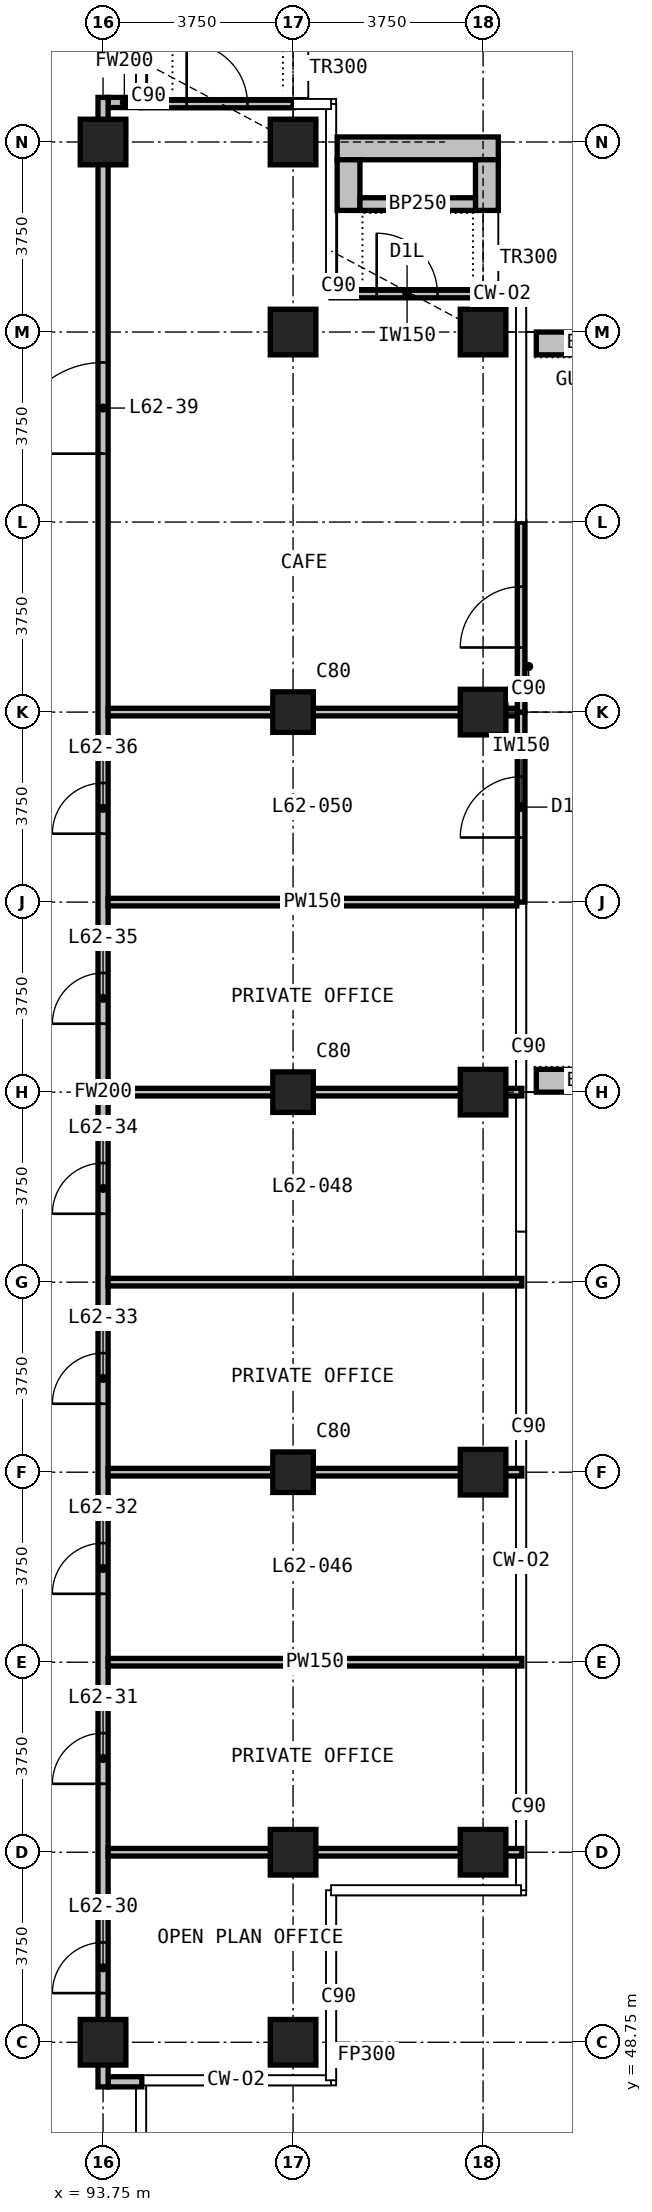
"""IFC4 building model, lengths in metres.
Left out: names, types, materials, properties, quantities, classifications, styles, units other than length and angle.
Written with IfcOpenShell. Run it as: python <this file> out.ifc"""

import sys

from ifc_helpers import new_model, si_unit, direction, frame, frame_2d, origin, origin_2d, place, context, subcontext, project, spatial, rectangle, extrude, element, fill, save


model = new_model("IFC4")
c1 = context("Model", 3, precision=1e-05, world=origin(), true_north=direction((0.0, 1.0)))
c2 = subcontext(c1, "Body", "Model", "MODEL_VIEW")
j1 = project(units=[si_unit("LENGTHUNIT", "METRE"), si_unit("PLANEANGLEUNIT", "RADIAN")], contexts=[c1])
p1 = place(None, origin())
s1 = spatial("IfcSite", under=j1, at=p1, CompositionType="ELEMENT")
p2 = place(p1, origin())
s2 = spatial("IfcBuilding", under=s1, at=p2, CompositionType="ELEMENT")
p3 = place(p2, frame((0.0, 0.0, 239.1)))
s3 = spatial("IfcBuildingStorey", under=s2, at=p3, CompositionType="ELEMENT", Elevation=239.1)
for number, where, z_axis, x_axis in (
    (1, (93.75, 48.75, 0.0), (0.0, 0.0, 1.0), (1.0, 0.0, 0.0)),
    (2, (93.75, 86.25, 0.0), (0.0, 0.0, 1.0), (1.0, 0.0, 0.0)),
    (3, (97.5, 48.75, 0.0), (0.0, 0.0, 1.0), (1.0, 0.0, 0.0)),
    (4, (97.5, 52.5, 0.0), (0.0, 0.0, 1.0), (1.0, 0.0, 0.0)),
):
    element("IfcColumn", number, at=place(p3, frame(where, z_axis=z_axis, x_axis=x_axis)), inside=s3, PredefinedType="COLUMN", context=c2, shape_type="SweptSolid", body=[
        extrude(rectangle(XDim=0.9, YDim=0.9, at=origin_2d()), origin(), (0.0, 0.0, 1.0), 3.6),
    ])
for number, where, z_axis, x_axis in (
    (5, (97.5, 60.0, 0.0), (0.0, 0.0, 1.0), (1.0, 0.0, 0.0)),
    (6, (97.5, 67.5, 0.0), (0.0, 0.0, 1.0), (1.0, 0.0, 0.0)),
    (7, (97.5, 75.0, 0.0), (0.0, 0.0, 1.0), (1.0, 0.0, 0.0)),
):
    element("IfcColumn", number, at=place(p3, frame(where, z_axis=z_axis, x_axis=x_axis)), inside=s3, PredefinedType="COLUMN", context=c2, shape_type="SweptSolid", body=[
        extrude(rectangle(XDim=0.8, YDim=0.8, at=origin_2d()), origin(), (0.0, 0.0, 1.0), 3.6),
    ])
for number, where, z_axis, x_axis in (
    (8, (97.5, 82.5, 0.0), (0.0, 0.0, 1.0), (1.0, 0.0, 0.0)),
    (9, (97.5, 86.25, 0.0), (0.0, 0.0, 1.0), (1.0, 0.0, 0.0)),
    (10, (101.25, 52.5, 0.0), (0.0, 0.0, 1.0), (1.0, 0.0, 0.0)),
    (11, (101.25, 60.0, 0.0), (0.0, 0.0, 1.0), (1.0, 0.0, 0.0)),
    (12, (101.25, 67.5, 0.0), (0.0, 0.0, 1.0), (1.0, 0.0, 0.0)),
    (13, (101.25, 75.0, 0.0), (0.0, 0.0, 1.0), (1.0, 0.0, 0.0)),
    (14, (101.25, 82.5, 0.0), (0.0, 0.0, 1.0), (1.0, 0.0, 0.0)),
):
    element("IfcColumn", number, at=place(p3, frame(where, z_axis=z_axis, x_axis=x_axis)), inside=s3, PredefinedType="COLUMN", context=c2, shape_type="SweptSolid", body=[
        extrude(rectangle(XDim=0.9, YDim=0.9, at=origin_2d()), origin(), (0.0, 0.0, 1.0), 3.6),
    ])
p4 = place(p3, frame((102.0, 71.25, 0.0), z_axis=(0.0, 0.0, 1.0), x_axis=(0.0, 1.0, 0.0)))
e15 = element("IfcWall", 15, at=p4, inside=s3, PredefinedType="SOLIDWALL", context=c2, shape_type="SweptSolid", body=[
    extrude(rectangle(XDim=3.75, YDim=0.15, at=frame_2d((1.875, 0.0))), origin(), (0.0, 0.0, 1.0), 3.3),
])
p5 = place(p4, frame((1.275, 0.0, 0.0)))
e16 = element("IfcOpeningElement", 16, at=p5, cuts=e15, PredefinedType="OPENING", context=c2, shape_type="SweptSolid", body=[
    extrude(rectangle(XDim=1.2, YDim=2.4, at=frame_2d((0.6, 1.2))), frame((0.0, 0.085, 0.0), z_axis=(0.0, -1.0, 0.0), x_axis=(1.0, 0.0, 0.0)), (0.0, 0.0, 1.0), 0.17),
])
p6 = place(p3, frame((102.0, 75.0, 0.0), z_axis=(0.0, 0.0, 1.0), x_axis=(0.0, 1.0, 0.0)))
e17 = element("IfcWall", 17, at=p6, inside=s3, PredefinedType="SOLIDWALL", context=c2, shape_type="SweptSolid", body=[
    extrude(rectangle(XDim=3.75, YDim=0.15, at=frame_2d((1.875, 0.0))), origin(), (0.0, 0.0, 1.0), 3.3),
])
p7 = place(p6, frame((1.275, 0.0, 0.0)))
e18 = element("IfcOpeningElement", 18, at=p7, cuts=e17, PredefinedType="OPENING", context=c2, shape_type="SweptSolid", body=[
    extrude(rectangle(XDim=1.2, YDim=2.4, at=frame_2d((0.6, 1.2))), frame((0.0, 0.085, 0.0), z_axis=(0.0, -1.0, 0.0), x_axis=(1.0, 0.0, 0.0)), (0.0, 0.0, 1.0), 0.17),
])
p8 = place(p3, frame((98.25, 83.25, 0.0), z_axis=(0.0, 0.0, 1.0), x_axis=(1.0, 0.0, 0.0)))
e19 = element("IfcWall", 19, at=p8, inside=s3, PredefinedType="SOLIDWALL", context=c2, shape_type="SweptSolid", body=[
    extrude(rectangle(XDim=3.0, YDim=0.15, at=frame_2d((1.5, 0.0))), origin(), (0.0, 0.0, 1.0), 3.3),
])
p9 = place(p8, frame((0.9, 0.0, 0.0)))
e20 = element("IfcOpeningElement", 20, at=p9, cuts=e19, PredefinedType="OPENING", context=c2, shape_type="SweptSolid", body=[
    extrude(rectangle(XDim=1.2, YDim=2.0, at=frame_2d((0.6, 1.0))), frame((0.0, 0.085, 0.0), z_axis=(0.0, -1.0, 0.0), x_axis=(1.0, 0.0, 0.0)), (0.0, 0.0, 1.0), 0.17),
])
p10 = place(p3, frame((94.5, 87.0, 0.0), z_axis=(0.0, 0.0, 1.0), x_axis=(1.0, 0.0, 0.0)))
e21 = element("IfcWall", 21, at=p10, inside=s3, PredefinedType="SOLIDWALL", context=c2, shape_type="SweptSolid", body=[
    extrude(rectangle(XDim=3.0, YDim=0.15, at=frame_2d((1.5, 0.0))), origin(), (0.0, 0.0, 1.0), 3.3),
])
p11 = place(p10, frame((0.9, 0.0, 0.0)))
e22 = element("IfcOpeningElement", 22, at=p11, cuts=e21, PredefinedType="OPENING", context=c2, shape_type="SweptSolid", body=[
    extrude(rectangle(XDim=1.2, YDim=2.0, at=frame_2d((0.6, 1.0))), frame((0.0, 0.085, 0.0), z_axis=(0.0, -1.0, 0.0), x_axis=(1.0, 0.0, 0.0)), (0.0, 0.0, 1.0), 0.17),
])
for number, where, z_axis, x_axis in (
    (23, (102.3, 67.725, 0.0), (0.0, 0.0, 1.0), (1.0, 0.0, 0.0)),
    (24, (102.3, 82.275, 0.0), (0.0, 0.0, 1.0), (1.0, 0.0, 0.0)),
):
    element("IfcWall", number, at=place(p3, frame(where, z_axis=z_axis, x_axis=x_axis)), inside=s3, PredefinedType="USERDEFINED", context=c2, shape_type="SweptSolid", body=[
        extrude(rectangle(XDim=2.35, YDim=0.45, at=frame_2d((1.175, 0.0))), origin(), (0.0, 0.0, 1.0), 1.1),
    ])
p12 = place(p3, frame((98.37, 86.125, 0.0), z_axis=(0.0, 0.0, 1.0), x_axis=(1.0, 0.0, 0.0)))
e25 = element("IfcWall", 25, at=p12, inside=s3, PredefinedType="USERDEFINED", context=c2, shape_type="SweptSolid", body=[
    extrude(rectangle(XDim=3.18, YDim=0.45, at=frame_2d((1.59, 0.0))), origin(), (0.0, 0.0, 1.0), 1.1),
])
for number, where, z_axis, x_axis in (
    (26, (98.595, 84.9, 0.0), (0.0, 0.0, 1.0), (0.0, 1.0, 0.0)),
    (27, (101.325, 84.9, 0.0), (0.0, 0.0, 1.0), (0.0, 1.0, 0.0)),
):
    element("IfcWall", number, at=place(p3, frame(where, z_axis=z_axis, x_axis=x_axis)), inside=s3, PredefinedType="USERDEFINED", context=c2, shape_type="SweptSolid", body=[
        extrude(rectangle(XDim=1.0, YDim=0.45, at=frame_2d((0.5, 0.0))), origin(), (0.0, 0.0, 1.0), 1.1),
    ])
p13 = place(p3, frame((98.82, 85.025, 0.0), z_axis=(0.0, 0.0, 1.0), x_axis=(1.0, 0.0, 0.0)))
e28 = element("IfcWall", 28, at=p13, inside=s3, PredefinedType="USERDEFINED", context=c2, shape_type="SweptSolid", body=[
    extrude(rectangle(XDim=2.28, YDim=0.25, at=frame_2d((1.14, 0.0))), origin(), (0.0, 0.0, 1.0), 1.0),
])
p14 = place(p3, frame((93.85, 47.97, 0.0), z_axis=(0.0, 0.0, 1.0), x_axis=(1.0, 0.0, 0.0)))
e29 = element("IfcWall", 29, at=p14, inside=s3, PredefinedType="PARTITIONING", context=c2, shape_type="SweptSolid", body=[
    extrude(rectangle(XDim=0.665, YDim=0.2, at=frame_2d((0.333, 0.0))), origin(), (0.0, 0.0, 1.0), 3.3),
])
p15 = place(p3, frame((93.85, 87.03, 0.0), z_axis=(0.0, 0.0, 1.0), x_axis=(1.0, 0.0, 0.0)))
e30 = element("IfcWall", 30, at=p15, inside=s3, PredefinedType="PARTITIONING", context=c2, shape_type="SweptSolid", body=[
    extrude(rectangle(XDim=0.64, YDim=0.2, at=frame_2d((0.32, 0.0))), origin(), (0.0, 0.0, 1.0), 3.3),
])
p16 = place(p3, frame((93.75, 47.87, 0.0), z_axis=(0.0, 0.0, 1.0), x_axis=(0.0, 1.0, 0.0)))
e31 = element("IfcWall", 31, at=p16, inside=s3, PredefinedType="PARTITIONING", context=c2, shape_type="SweptSolid", body=[
    extrude(rectangle(XDim=39.26, YDim=0.2, at=frame_2d((19.63, 0.0))), origin(), (0.0, 0.0, 1.0), 3.3),
])
p17 = place(p16, frame((1.85, 0.0, 0.0)))
e32 = element("IfcOpeningElement", 32, at=p17, cuts=e31, PredefinedType="OPENING", context=c2, shape_type="SweptSolid", body=[
    extrude(rectangle(XDim=1.0, YDim=2.2, at=frame_2d((0.5, 1.1))), frame((0.0, 0.11, 0.0), z_axis=(0.0, -1.0, 0.0), x_axis=(1.0, 0.0, 0.0)), (0.0, 0.0, 1.0), 0.22),
])
p18 = place(p16, frame((5.98, 0.0, 0.0)))
e33 = element("IfcOpeningElement", 33, at=p18, cuts=e31, PredefinedType="OPENING", context=c2, shape_type="SweptSolid", body=[
    extrude(rectangle(XDim=1.0, YDim=2.2, at=frame_2d((0.5, 1.1))), frame((0.0, 0.11, 0.0), z_axis=(0.0, -1.0, 0.0), x_axis=(1.0, 0.0, 0.0)), (0.0, 0.0, 1.0), 0.22),
])
p19 = place(p16, frame((9.73, 0.0, 0.0)))
e34 = element("IfcOpeningElement", 34, at=p19, cuts=e31, PredefinedType="OPENING", context=c2, shape_type="SweptSolid", body=[
    extrude(rectangle(XDim=1.0, YDim=2.2, at=frame_2d((0.5, 1.1))), frame((0.0, 0.11, 0.0), z_axis=(0.0, -1.0, 0.0), x_axis=(1.0, 0.0, 0.0)), (0.0, 0.0, 1.0), 0.22),
])
p20 = place(p16, frame((13.48, 0.0, 0.0)))
e35 = element("IfcOpeningElement", 35, at=p20, cuts=e31, PredefinedType="OPENING", context=c2, shape_type="SweptSolid", body=[
    extrude(rectangle(XDim=1.0, YDim=2.2, at=frame_2d((0.5, 1.1))), frame((0.0, 0.11, 0.0), z_axis=(0.0, -1.0, 0.0), x_axis=(1.0, 0.0, 0.0)), (0.0, 0.0, 1.0), 0.22),
])
p21 = place(p16, frame((17.23, 0.0, 0.0)))
e36 = element("IfcOpeningElement", 36, at=p21, cuts=e31, PredefinedType="OPENING", context=c2, shape_type="SweptSolid", body=[
    extrude(rectangle(XDim=1.0, YDim=2.2, at=frame_2d((0.5, 1.1))), frame((0.0, 0.11, 0.0), z_axis=(0.0, -1.0, 0.0), x_axis=(1.0, 0.0, 0.0)), (0.0, 0.0, 1.0), 0.22),
])
p22 = place(p16, frame((20.98, 0.0, 0.0)))
e37 = element("IfcOpeningElement", 37, at=p22, cuts=e31, PredefinedType="OPENING", context=c2, shape_type="SweptSolid", body=[
    extrude(rectangle(XDim=1.0, YDim=2.2, at=frame_2d((0.5, 1.1))), frame((0.0, 0.11, 0.0), z_axis=(0.0, -1.0, 0.0), x_axis=(1.0, 0.0, 0.0)), (0.0, 0.0, 1.0), 0.22),
])
p23 = place(p16, frame((24.73, 0.0, 0.0)))
e38 = element("IfcOpeningElement", 38, at=p23, cuts=e31, PredefinedType="OPENING", context=c2, shape_type="SweptSolid", body=[
    extrude(rectangle(XDim=1.0, YDim=2.2, at=frame_2d((0.5, 1.1))), frame((0.0, 0.11, 0.0), z_axis=(0.0, -1.0, 0.0), x_axis=(1.0, 0.0, 0.0)), (0.0, 0.0, 1.0), 0.22),
])
p24 = place(p16, frame((32.23, 0.0, 0.0)))
e39 = element("IfcOpeningElement", 39, at=p24, cuts=e31, PredefinedType="OPENING", context=c2, shape_type="SweptSolid", body=[
    extrude(rectangle(XDim=1.8, YDim=2.2, at=frame_2d((0.9, 1.1))), frame((0.0, 0.11, 0.0), z_axis=(0.0, -1.0, 0.0), x_axis=(1.0, 0.0, 0.0)), (0.0, 0.0, 1.0), 0.22),
])
for number, where, z_axis, x_axis in (
    (40, (93.85, 52.5, 0.0), (0.0, 0.0, 1.0), (1.0, 0.0, 0.0)),
    (41, (93.85, 56.25, 0.0), (0.0, 0.0, 1.0), (1.0, 0.0, 0.0)),
    (42, (93.85, 60.0, 0.0), (0.0, 0.0, 1.0), (1.0, 0.0, 0.0)),
    (43, (93.85, 63.75, 0.0), (0.0, 0.0, 1.0), (1.0, 0.0, 0.0)),
    (44, (93.85, 67.5, 0.0), (0.0, 0.0, 1.0), (1.0, 0.0, 0.0)),
):
    element("IfcWall", number, at=place(p3, frame(where, z_axis=z_axis, x_axis=x_axis)), inside=s3, PredefinedType="PARTITIONING", context=c2, shape_type="SweptSolid", body=[
        extrude(rectangle(XDim=8.165, YDim=0.15, at=frame_2d((4.083, 0.0))), origin(), (0.0, 0.0, 1.0), 3.3),
    ])
for number, where, z_axis, x_axis in (
    (45, (93.85, 71.25, 0.0), (0.0, 0.0, 1.0), (1.0, 0.0, 0.0)),
    (46, (93.85, 75.0, 0.0), (0.0, 0.0, 1.0), (1.0, 0.0, 0.0)),
):
    element("IfcWall", number, at=place(p3, frame(where, z_axis=z_axis, x_axis=x_axis)), inside=s3, PredefinedType="PARTITIONING", context=c2, shape_type="SweptSolid", body=[
        extrude(rectangle(XDim=8.065, YDim=0.15, at=frame_2d((4.032, 0.0))), origin(), (0.0, 0.0, 1.0), 3.3),
    ])
p25 = place(p5, origin())
e47 = element("IfcDoor", 47, at=p25, inside=s3, OperationType="SINGLE_SWING_LEFT", PredefinedType="DOOR", context=c2, shape_type="SweptSolid", body=[
    extrude(rectangle(XDim=1.2, YDim=2.4, at=frame_2d((0.6, 1.2))), frame((0.0, 0.025, 0.0), z_axis=(0.0, -1.0, 0.0), x_axis=(1.0, 0.0, 0.0)), (0.0, 0.0, 1.0), 0.05),
])
fill(e16, e47)
p26 = place(p7, origin())
e48 = element("IfcDoor", 48, at=p26, inside=s3, OperationType="SINGLE_SWING_LEFT", PredefinedType="DOOR", context=c2, shape_type="SweptSolid", body=[
    extrude(rectangle(XDim=1.2, YDim=2.4, at=frame_2d((0.6, 1.2))), frame((0.0, 0.025, 0.0), z_axis=(0.0, -1.0, 0.0), x_axis=(1.0, 0.0, 0.0)), (0.0, 0.0, 1.0), 0.05),
])
fill(e18, e48)
p27 = place(p9, origin())
e49 = element("IfcDoor", 49, at=p27, inside=s3, OperationType="SINGLE_SWING_LEFT", PredefinedType="DOOR", context=c2, shape_type="SweptSolid", body=[
    extrude(rectangle(XDim=1.2, YDim=2.0, at=frame_2d((0.6, 1.0))), frame((0.0, 0.025, 0.0), z_axis=(0.0, -1.0, 0.0), x_axis=(1.0, 0.0, 0.0)), (0.0, 0.0, 1.0), 0.05),
])
fill(e20, e49)
p28 = place(p11, origin())
e50 = element("IfcDoor", 50, at=p28, inside=s3, OperationType="SINGLE_SWING_LEFT", PredefinedType="DOOR", context=c2, shape_type="SweptSolid", body=[
    extrude(rectangle(XDim=1.2, YDim=2.0, at=frame_2d((0.6, 1.0))), frame((0.0, 0.025, 0.0), z_axis=(0.0, -1.0, 0.0), x_axis=(1.0, 0.0, 0.0)), (0.0, 0.0, 1.0), 0.05),
])
fill(e22, e50)
p29 = place(p17, origin())
e51 = element("IfcDoor", 51, at=p29, inside=s3, OperationType="SINGLE_SWING_RIGHT", PredefinedType="DOOR", context=c2, shape_type="SweptSolid", body=[
    extrude(rectangle(XDim=1.0, YDim=2.2, at=frame_2d((0.5, 1.1))), frame((0.0, 0.025, 0.0), z_axis=(0.0, -1.0, 0.0), x_axis=(1.0, 0.0, 0.0)), (0.0, 0.0, 1.0), 0.05),
])
fill(e32, e51)
p30 = place(p18, origin())
e52 = element("IfcDoor", 52, at=p30, inside=s3, OperationType="SINGLE_SWING_LEFT", PredefinedType="DOOR", context=c2, shape_type="SweptSolid", body=[
    extrude(rectangle(XDim=1.0, YDim=2.2, at=frame_2d((0.5, 1.1))), frame((0.0, 0.025, 0.0), z_axis=(0.0, -1.0, 0.0), x_axis=(1.0, 0.0, 0.0)), (0.0, 0.0, 1.0), 0.05),
])
fill(e33, e52)
p31 = place(p19, origin())
e53 = element("IfcDoor", 53, at=p31, inside=s3, OperationType="SINGLE_SWING_LEFT", PredefinedType="DOOR", context=c2, shape_type="SweptSolid", body=[
    extrude(rectangle(XDim=1.0, YDim=2.2, at=frame_2d((0.5, 1.1))), frame((0.0, 0.025, 0.0), z_axis=(0.0, -1.0, 0.0), x_axis=(1.0, 0.0, 0.0)), (0.0, 0.0, 1.0), 0.05),
])
fill(e34, e53)
p32 = place(p20, origin())
e54 = element("IfcDoor", 54, at=p32, inside=s3, OperationType="SINGLE_SWING_RIGHT", PredefinedType="DOOR", context=c2, shape_type="SweptSolid", body=[
    extrude(rectangle(XDim=1.0, YDim=2.2, at=frame_2d((0.5, 1.1))), frame((0.0, 0.025, 0.0), z_axis=(0.0, -1.0, 0.0), x_axis=(1.0, 0.0, 0.0)), (0.0, 0.0, 1.0), 0.05),
])
fill(e35, e54)
p33 = place(p21, origin())
e55 = element("IfcDoor", 55, at=p33, inside=s3, OperationType="SINGLE_SWING_LEFT", PredefinedType="DOOR", context=c2, shape_type="SweptSolid", body=[
    extrude(rectangle(XDim=1.0, YDim=2.2, at=frame_2d((0.5, 1.1))), frame((0.0, 0.025, 0.0), z_axis=(0.0, -1.0, 0.0), x_axis=(1.0, 0.0, 0.0)), (0.0, 0.0, 1.0), 0.05),
])
fill(e36, e55)
p34 = place(p22, origin())
e56 = element("IfcDoor", 56, at=p34, inside=s3, OperationType="SINGLE_SWING_LEFT", PredefinedType="DOOR", context=c2, shape_type="SweptSolid", body=[
    extrude(rectangle(XDim=1.0, YDim=2.2, at=frame_2d((0.5, 1.1))), frame((0.0, 0.025, 0.0), z_axis=(0.0, -1.0, 0.0), x_axis=(1.0, 0.0, 0.0)), (0.0, 0.0, 1.0), 0.05),
])
fill(e37, e56)
p35 = place(p23, origin())
e57 = element("IfcDoor", 57, at=p35, inside=s3, OperationType="SINGLE_SWING_RIGHT", PredefinedType="DOOR", context=c2, shape_type="SweptSolid", body=[
    extrude(rectangle(XDim=1.0, YDim=2.2, at=frame_2d((0.5, 1.1))), frame((0.0, 0.025, 0.0), z_axis=(0.0, -1.0, 0.0), x_axis=(1.0, 0.0, 0.0)), (0.0, 0.0, 1.0), 0.05),
])
fill(e38, e57)
p36 = place(p24, origin())
e58 = element("IfcDoor", 58, at=p36, inside=s3, OperationType="DOUBLE_DOOR_SINGLE_SWING", PredefinedType="DOOR", context=c2, shape_type="SweptSolid", body=[
    extrude(rectangle(XDim=1.8, YDim=2.2, at=frame_2d((0.9, 1.1))), frame((0.0, 0.025, 0.0), z_axis=(0.0, -1.0, 0.0), x_axis=(1.0, 0.0, 0.0)), (0.0, 0.0, 1.0), 0.05),
])
fill(e39, e58)
save(model, sys.argv[1])
